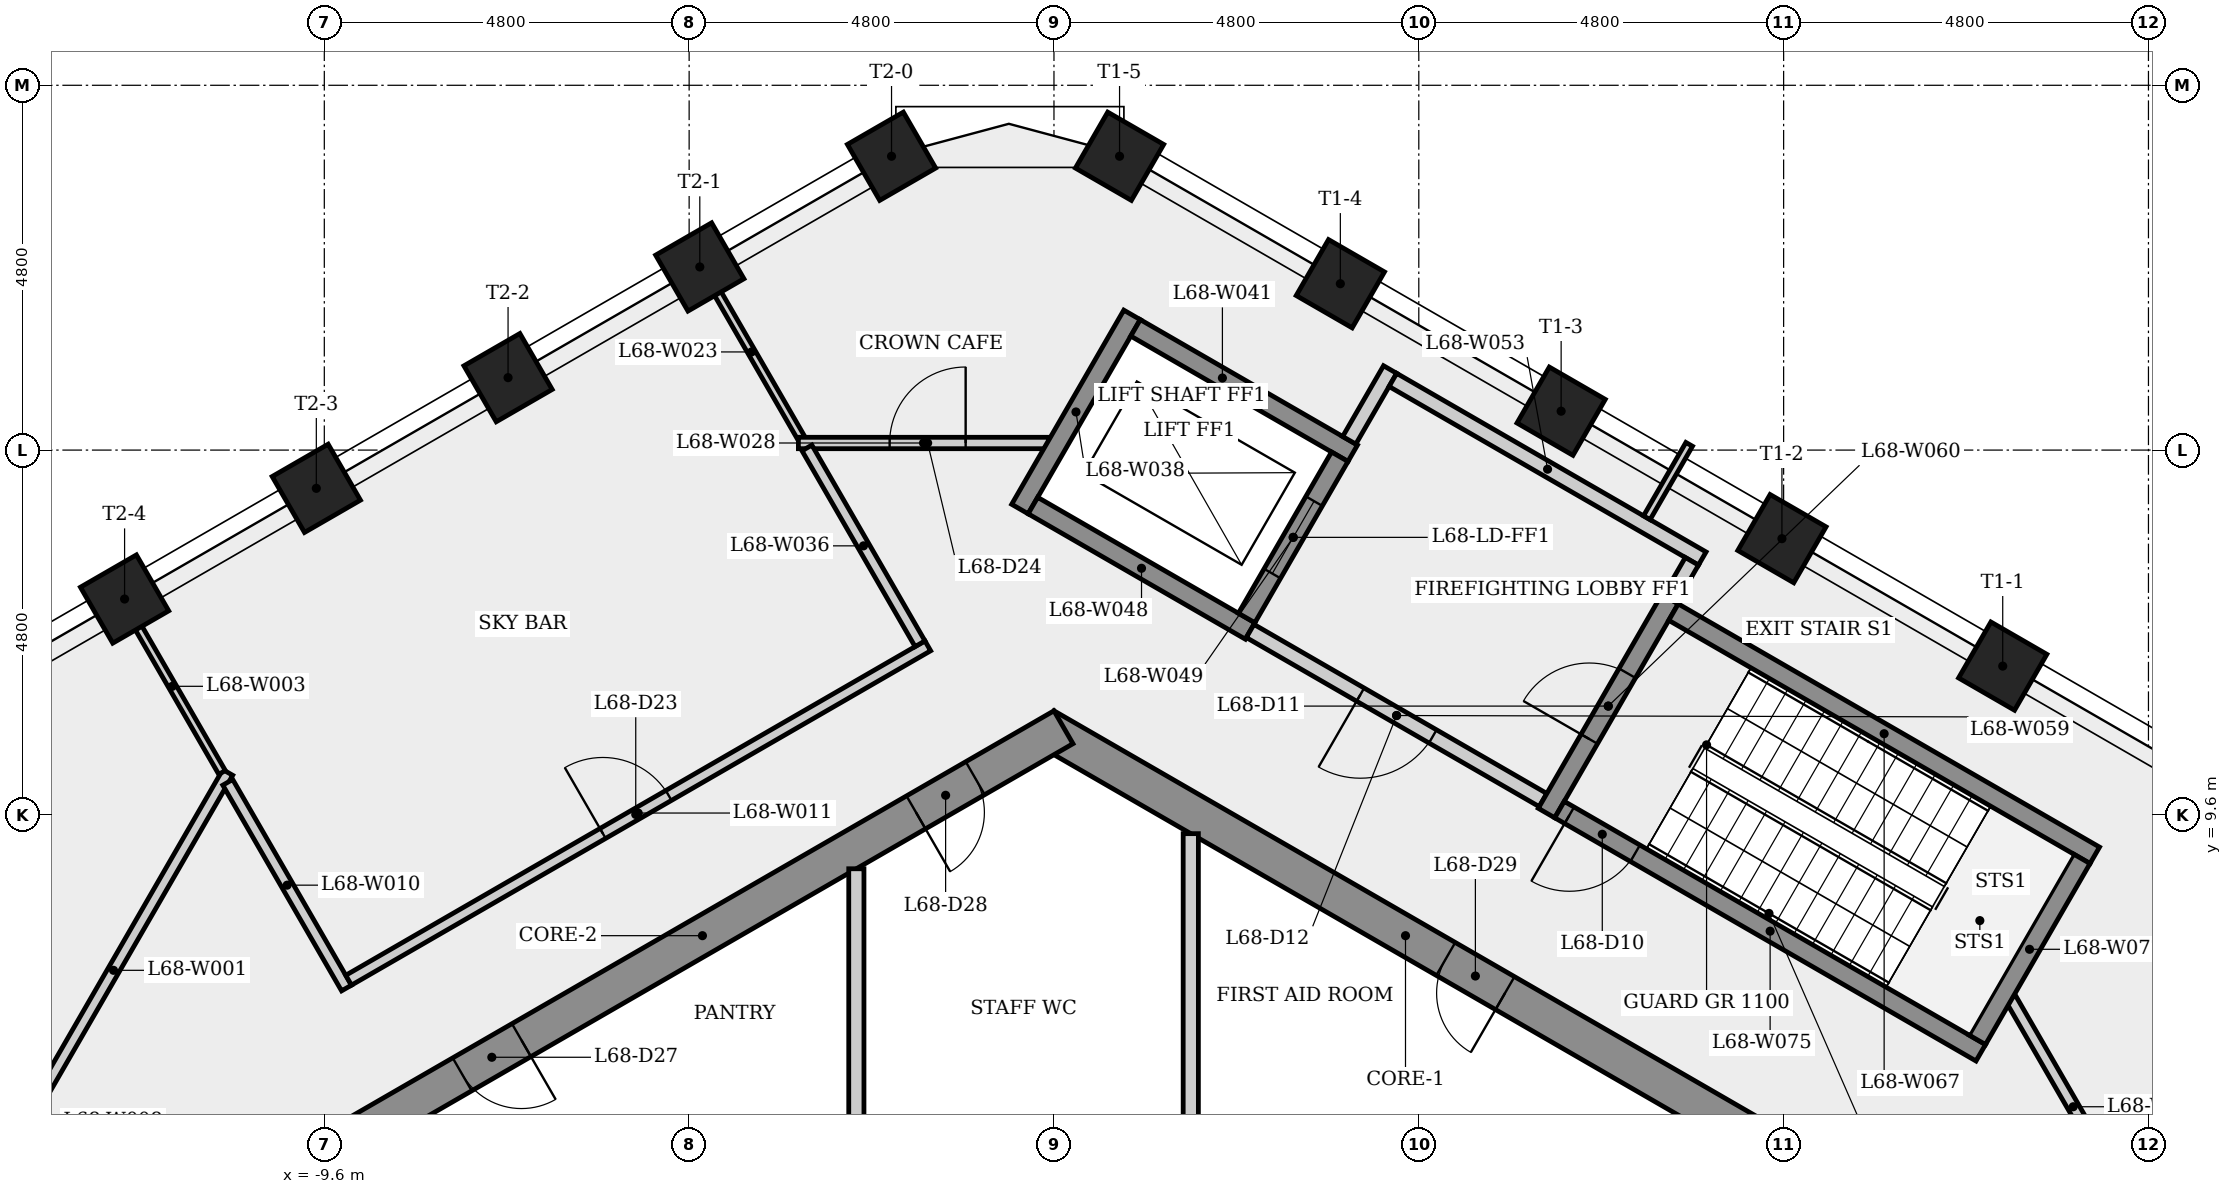
"""IFC4 building model, lengths in metres.
Left out: names, types, materials, properties, quantities, classifications, styles, units other than length and angle.
Written with IfcOpenShell. Run it as: python <this file> out.ifc"""

import sys

from ifc_helpers import new_model, si_unit, direction, frame, frame_2d, origin, origin_2d, place, context, subcontext, project, spatial, rectangle, extrude, element, fill, save


model = new_model("IFC4")
c1 = context("Model", 3, precision=1e-05, world=origin(), true_north=direction((0.0, 1.0)))
c2 = subcontext(c1, "Body", "Model", "MODEL_VIEW")
j1 = project(units=[si_unit("LENGTHUNIT", "METRE"), si_unit("PLANEANGLEUNIT", "RADIAN")], contexts=[c1])
p1 = place(None, origin())
s1 = spatial("IfcSite", under=j1, at=p1, CompositionType="ELEMENT")
p2 = place(p1, origin())
s2 = spatial("IfcBuilding", under=s1, at=p2, CompositionType="ELEMENT")
p3 = place(p2, frame((0.0, 0.0, 252.9)))
s3 = spatial("IfcBuildingStorey", under=s2, at=p3, CompositionType="ELEMENT", Elevation=252.9)
p4 = place(p3, frame((9.375, 5.268, 0.0), z_axis=(0.0, 0.0, 1.0), x_axis=(-0.866023993627, 0.500002442456, 0.0)))
e1 = element("IfcWall", 1, at=p4, inside=s3, PredefinedType="SHEAR", context=c2, shape_type="SweptSolid", body=[
    extrude(rectangle(XDim=10.97, YDim=0.5, at=frame_2d((5.485, 0.0))), origin(), (0.0, 0.0, 1.0), 5.0),
])
p5 = place(p4, frame((3.973, 0.0, 0.0)))
e2 = element("IfcOpeningElement", 2, at=p5, cuts=e1, PredefinedType="OPENING", context=c2, shape_type="SweptSolid", body=[
    extrude(rectangle(XDim=0.9, YDim=2.1, at=frame_2d((0.45, 1.05))), frame((0.0, 0.26, 0.0), z_axis=(0.0, -1.0, 0.0), x_axis=(1.0, 0.0, 0.0)), (0.0, 0.0, 1.0), 0.52),
])
p6 = place(p3, frame((0.125, 10.753, 0.0), z_axis=(0.0, 0.0, 1.0), x_axis=(-0.866023993627, -0.500002442456, 0.0)))
e3 = element("IfcWall", 3, at=p6, inside=s3, PredefinedType="SHEAR", context=c2, shape_type="SweptSolid", body=[
    extrude(rectangle(XDim=10.97, YDim=0.5, at=frame_2d((5.485, 0.0))), origin(), (0.0, 0.0, 1.0), 5.0),
])
p7 = place(p6, frame((8.235, 0.0, 0.0)))
e4 = element("IfcOpeningElement", 4, at=p7, cuts=e3, PredefinedType="OPENING", context=c2, shape_type="SweptSolid", body=[
    extrude(rectangle(XDim=0.9, YDim=2.1, at=frame_2d((0.45, 1.05))), frame((0.0, 0.26, 0.0), z_axis=(0.0, -1.0, 0.0), x_axis=(1.0, 0.0, 0.0)), (0.0, 0.0, 1.0), 0.52),
])
p8 = place(p6, frame((1.34, 0.0, 0.0)))
e5 = element("IfcOpeningElement", 5, at=p8, cuts=e3, PredefinedType="OPENING", context=c2, shape_type="SweptSolid", body=[
    extrude(rectangle(XDim=0.9, YDim=2.1, at=frame_2d((0.45, 1.05))), frame((0.0, 0.26, 0.0), z_axis=(0.0, -1.0, 0.0), x_axis=(1.0, 0.0, 0.0)), (0.0, 0.0, 1.0), 0.52),
])
for number, where, z_axis, x_axis in (
    (6, (12.483, 11.558, 0.0), (0.0, 0.0, 1.0), (0.5, 0.866, 0.0)),
    (7, (9.578, 13.235, 0.0), (0.0, 0.0, 1.0), (0.5, 0.866, 0.0)),
    (8, (6.673, 14.912, 0.0), (0.0, 0.0, 1.0), (0.5, 0.866, 0.0)),
    (9, (3.768, 16.589, 0.0), (0.0, 0.0, 1.0), (0.5, 0.866, 0.0)),
    (10, (0.863, 18.266, 0.0), (0.0, 0.0, 1.0), (0.5, 0.866, 0.0)),
    (11, (-2.137, 18.266, 0.0), (0.0, 0.0, 1.0), (-0.5, 0.866, 0.0)),
    (12, (-4.66, 16.81, 0.0), (0.0, 0.0, 1.0), (-0.5, 0.866, 0.0)),
    (13, (-7.182, 15.353, 0.0), (0.0, 0.0, 1.0), (-0.5, 0.866, 0.0)),
    (14, (-9.705, 13.897, 0.0), (0.0, 0.0, 1.0), (-0.5, 0.866, 0.0)),
    (15, (-12.228, 12.44, 0.0), (0.0, 0.0, 1.0), (-0.5, 0.866, 0.0)),
):
    element("IfcColumn", number, at=place(p3, frame(where, z_axis=z_axis, x_axis=x_axis)), inside=s3, PredefinedType="COLUMN", context=c2, shape_type="SweptSolid", body=[
        extrude(rectangle(XDim=0.85, YDim=0.85, at=origin_2d()), origin(), (0.0, 0.0, 1.0), 5.0),
    ])
p9 = place(p3, frame((-13.877, 4.951, 0.0), z_axis=(0.0, 0.0, 1.0), x_axis=(0.49999074569, 0.866030746697, 0.0)))
e16 = element("IfcWall", 16, at=p9, inside=s3, PredefinedType="PARTITIONING", context=c2, shape_type="SweptSolid", body=[
    extrude(rectangle(XDim=6.013, YDim=0.15, at=frame_2d((3.006, 0.0))), origin(), (0.0, 0.0, 1.0), 4.6),
])
p10 = place(p3, frame((-12.254, 12.425, 0.0), z_axis=(0.0, 0.0, 1.0), x_axis=(0.49999161165, -0.866030246746, 0.0)))
e17 = element("IfcWall", 17, at=p10, inside=s3, PredefinedType="PARTITIONING", context=c2, shape_type="SweptSolid", body=[
    extrude(rectangle(XDim=2.617, YDim=0.1, at=frame_2d((1.309, 0.0))), origin(), (0.0, 0.0, 1.0), 4.6),
])
p11 = place(p3, frame((-10.87, 10.029, 0.0), z_axis=(0.0, 0.0, 1.0), x_axis=(0.499995170647, -0.866028191995, 0.0)))
e18 = element("IfcWall", 18, at=p11, inside=s3, PredefinedType="PARTITIONING", context=c2, shape_type="SweptSolid", body=[
    extrude(rectangle(XDim=3.125, YDim=0.15, at=frame_2d((1.563, 0.0))), origin(), (0.0, 0.0, 1.0), 4.6),
])
p12 = place(p3, frame((-9.28, 7.425, 0.0), z_axis=(0.0, 0.0, 1.0), x_axis=(0.866023408847, 0.500003455318, 0.0)))
e19 = element("IfcWall", 19, at=p12, inside=s3, PredefinedType="PARTITIONING", context=c2, shape_type="SweptSolid", body=[
    extrude(rectangle(XDim=8.799, YDim=0.15, at=frame_2d((4.4, 0.0))), origin(), (0.0, 0.0, 1.0), 4.6),
])
p13 = place(p12, frame((3.862, 0.0, 0.0)))
e20 = element("IfcOpeningElement", 20, at=p13, cuts=e19, PredefinedType="OPENING", context=c2, shape_type="SweptSolid", body=[
    extrude(rectangle(XDim=1.0, YDim=2.1, at=frame_2d((0.5, 1.05))), frame((0.0, 0.085, 0.0), z_axis=(0.0, -1.0, 0.0), x_axis=(1.0, 0.0, 0.0)), (0.0, 0.0, 1.0), 0.17),
])
p14 = place(p3, frame((-4.634, 16.825, 0.0), z_axis=(0.0, 0.0, 1.0), x_axis=(0.49999161165, -0.866030246746, 0.0)))
e21 = element("IfcWall", 21, at=p14, inside=s3, PredefinedType="PARTITIONING", context=c2, shape_type="SweptSolid", body=[
    extrude(rectangle(XDim=2.617, YDim=0.1, at=frame_2d((1.309, 0.0))), origin(), (0.0, 0.0, 1.0), 4.6),
])
p15 = place(p3, frame((-3.363, 14.493, 0.0), z_axis=(0.0, 0.0, 1.0), x_axis=(1.0, 0.0, 0.0)))
e22 = element("IfcWall", 22, at=p15, inside=s3, PredefinedType="PARTITIONING", context=c2, shape_type="SweptSolid", body=[
    extrude(rectangle(XDim=3.291, YDim=0.15, at=frame_2d((1.646, 0.0))), origin(), (0.0, 0.0, 1.0), 4.6),
])
p16 = place(p15, frame((1.2, 0.0, 0.0)))
e23 = element("IfcOpeningElement", 23, at=p16, cuts=e22, PredefinedType="OPENING", context=c2, shape_type="SweptSolid", body=[
    extrude(rectangle(XDim=1.0, YDim=2.1, at=frame_2d((0.5, 1.05))), frame((0.0, 0.085, 0.0), z_axis=(0.0, -1.0, 0.0), x_axis=(1.0, 0.0, 0.0)), (0.0, 0.0, 1.0), 0.17),
])
p17 = place(p3, frame((-2.6, 8.891, 0.0), z_axis=(0.0, 0.0, 1.0), x_axis=(0.0, -1.0, 0.0)))
e24 = element("IfcWall", 24, at=p17, inside=s3, PredefinedType="PARTITIONING", context=c2, shape_type="SweptSolid", body=[
    extrude(rectangle(XDim=3.616, YDim=0.2, at=frame_2d((1.808, 0.0))), origin(), (0.0, 0.0, 1.0), 4.6),
])
p18 = place(p3, frame((-1.762, 11.852, 0.0), z_axis=(0.0, 0.0, 1.0), x_axis=(-0.50007524384, 0.865981957375, 0.0)))
e25 = element("IfcWall", 25, at=p18, inside=s3, PredefinedType="PARTITIONING", context=c2, shape_type="SweptSolid", body=[
    extrude(rectangle(XDim=2.975, YDim=0.15, at=frame_2d((1.488, 0.0))), origin(), (0.0, 0.0, 1.0), 4.6),
])
p19 = place(p3, frame((-0.448, 13.624, 0.0), z_axis=(0.0, 0.0, 1.0), x_axis=(0.500037662692, 0.866003658127, 0.0)))
e26 = element("IfcWall", 26, at=p19, inside=s3, PredefinedType="SHEAR", context=c2, shape_type="SweptSolid", body=[
    extrude(rectangle(XDim=2.95, YDim=0.25, at=frame_2d((1.475, 0.0))), origin(), (0.0, 0.0, 1.0), 4.6),
])
p20 = place(p3, frame((1.073, 16.008, 0.0), z_axis=(0.0, 0.0, 1.0), x_axis=(0.866040211805, -0.499974350878, 0.0)))
e27 = element("IfcWall", 27, at=p20, inside=s3, PredefinedType="SHEAR", context=c2, shape_type="SweptSolid", body=[
    extrude(rectangle(XDim=3.3, YDim=0.25, at=frame_2d((1.65, 0.0))), origin(), (0.0, 0.0, 1.0), 4.6),
])
p21 = place(p3, frame((1.8, 9.353, 0.0), z_axis=(0.0, 0.0, 1.0), x_axis=(0.0, -1.0, 0.0)))
e28 = element("IfcWall", 28, at=p21, inside=s3, PredefinedType="PARTITIONING", context=c2, shape_type="SweptSolid", body=[
    extrude(rectangle(XDim=4.078, YDim=0.2, at=frame_2d((2.039, 0.0))), origin(), (0.0, 0.0, 1.0), 4.6),
])
p22 = place(p3, frame((2.581, 12.02, 0.0), z_axis=(0.0, 0.0, 1.0), x_axis=(-0.866040211805, 0.499974350878, 0.0)))
e29 = element("IfcWall", 29, at=p22, inside=s3, PredefinedType="SHEAR", context=c2, shape_type="SweptSolid", body=[
    extrude(rectangle(XDim=3.3, YDim=0.25, at=frame_2d((1.65, 0.0))), origin(), (0.0, 0.0, 1.0), 4.6),
])
p23 = place(p3, frame((2.535, 12.191, 0.0), z_axis=(0.0, 0.0, 1.0), x_axis=(0.500061746146, 0.865989751695, 0.0)))
e30 = element("IfcWall", 30, at=p23, inside=s3, PredefinedType="SHEAR", context=c2, shape_type="SweptSolid", body=[
    extrude(rectangle(XDim=2.45, YDim=0.25, at=frame_2d((1.225, 0.0))), origin(), (0.0, 0.0, 1.0), 5.0),
])
p24 = place(p23, frame((0.675, 0.0, 0.0)))
e31 = element("IfcOpeningElement", 31, at=p24, cuts=e30, PredefinedType="OPENING", context=c2, shape_type="SweptSolid", body=[
    extrude(rectangle(XDim=1.1, YDim=2.1, at=frame_2d((0.55, 1.05))), frame((0.0, 0.135, 0.0), z_axis=(0.0, -1.0, 0.0), x_axis=(1.0, 0.0, 0.0)), (0.0, 0.0, 1.0), 0.27),
])
p25 = place(p3, frame((3.885, 14.529, 0.0), z_axis=(0.0, 0.0, 1.0), x_axis=(0.499997628298, 0.866026773083, 0.0)))
e32 = element("IfcWall", 32, at=p25, inside=s3, PredefinedType="PARTITIONING", context=c2, shape_type="SweptSolid", body=[
    extrude(rectangle(XDim=1.075, YDim=0.2, at=frame_2d((0.538, 0.0))), origin(), (0.0, 0.0, 1.0), 4.6),
])
p26 = place(p3, frame((4.459, 15.323, 0.0), z_axis=(0.0, 0.0, 1.0), x_axis=(0.866016039709, -0.500016218704, 0.0)))
e33 = element("IfcWall", 33, at=p26, inside=s3, PredefinedType="PARTITIONING", context=c2, shape_type="SweptSolid", body=[
    extrude(rectangle(XDim=4.7, YDim=0.2, at=frame_2d((2.35, 0.0))), origin(), (0.0, 0.0, 1.0), 4.6),
])
p27 = place(p3, frame((6.435, 9.795, 0.0), z_axis=(0.0, 0.0, 1.0), x_axis=(-0.866012907634, 0.500021643343, 0.0)))
e34 = element("IfcWall", 34, at=p27, inside=s3, PredefinedType="PARTITIONING", context=c2, shape_type="SweptSolid", body=[
    extrude(rectangle(XDim=4.45, YDim=0.2, at=frame_2d((2.225, 0.0))), origin(), (0.0, 0.0, 1.0), 4.6),
])
p28 = place(p27, frame((1.675, 0.0, 0.0)))
e35 = element("IfcOpeningElement", 35, at=p28, cuts=e34, PredefinedType="OPENING", context=c2, shape_type="SweptSolid", body=[
    extrude(rectangle(XDim=1.1, YDim=2.1, at=frame_2d((0.55, 1.05))), frame((0.0, 0.11, 0.0), z_axis=(0.0, -1.0, 0.0), x_axis=(1.0, 0.0, 0.0)), (0.0, 0.0, 1.0), 0.22),
])
p29 = place(p3, frame((6.48, 9.624, 0.0), z_axis=(0.0, 0.0, 1.0), x_axis=(0.500017246033, 0.866015446554, 0.0)))
e36 = element("IfcWall", 36, at=p29, inside=s3, PredefinedType="SHEAR", context=c2, shape_type="SweptSolid", body=[
    extrude(rectangle(XDim=3.25, YDim=0.25, at=frame_2d((1.625, 0.0))), origin(), (0.0, 0.0, 1.0), 4.6),
])
p30 = place(p29, frame((1.125, 0.0, 0.0)))
e37 = element("IfcOpeningElement", 37, at=p30, cuts=e36, PredefinedType="OPENING", context=c2, shape_type="SweptSolid", body=[
    extrude(rectangle(XDim=1.0, YDim=2.1, at=frame_2d((0.5, 1.05))), frame((0.0, 0.135, 0.0), z_axis=(0.0, -1.0, 0.0), x_axis=(1.0, 0.0, 0.0)), (0.0, 0.0, 1.0), 0.27),
])
p31 = place(p3, frame((7.8, 13.51, 0.0), z_axis=(0.0, 0.0, 1.0), x_axis=(0.499930968087, 0.86606525571, 0.0)))
e38 = element("IfcWall", 38, at=p31, inside=s3, PredefinedType="PARTITIONING", context=c2, shape_type="SweptSolid", body=[
    extrude(rectangle(XDim=1.115, YDim=0.1, at=frame_2d((0.558, 0.0))), origin(), (0.0, 0.0, 1.0), 4.6),
])
p32 = place(p3, frame((8.151, 12.268, 0.0), z_axis=(0.0, 0.0, 1.0), x_axis=(0.866025499775, -0.499999833739, 0.0)))
e39 = element("IfcWall", 39, at=p32, inside=s3, PredefinedType="SHEAR", context=c2, shape_type="SweptSolid", body=[
    extrude(rectangle(XDim=6.4, YDim=0.25, at=frame_2d((3.2, 0.0))), origin(), (0.0, 0.0, 1.0), 4.6),
])
p33 = place(p3, frame((8.393, 12.937, 0.0), z_axis=(0.0, 0.0, 1.0), x_axis=(-0.500065409566, -0.86598763626, 0.0)))
e40 = element("IfcWall", 40, at=p33, inside=s3, PredefinedType="PARTITIONING", context=c2, shape_type="SweptSolid", body=[
    extrude(rectangle(XDim=0.575, YDim=0.2, at=frame_2d((0.288, 0.0))), origin(), (0.0, 0.0, 1.0), 4.6),
])
p34 = place(p3, frame((12.194, 6.47, 0.0), z_axis=(0.0, 0.0, 1.0), x_axis=(-0.866025499775, 0.499999833739, 0.0)))
e41 = element("IfcWall", 41, at=p34, inside=s3, PredefinedType="SHEAR", context=c2, shape_type="SweptSolid", body=[
    extrude(rectangle(XDim=6.4, YDim=0.25, at=frame_2d((3.2, 0.0))), origin(), (0.0, 0.0, 1.0), 4.6),
])
p35 = place(p34, frame((5.25, 0.0, 0.0)))
e42 = element("IfcOpeningElement", 42, at=p35, cuts=e41, PredefinedType="OPENING", context=c2, shape_type="SweptSolid", body=[
    extrude(rectangle(XDim=1.0, YDim=2.1, at=frame_2d((0.5, 1.05))), frame((0.0, 0.135, 0.0), z_axis=(0.0, -1.0, 0.0), x_axis=(1.0, 0.0, 0.0)), (0.0, 0.0, 1.0), 0.27),
])
p36 = place(p3, frame((12.587, 7.185, 0.0), z_axis=(0.0, 0.0, 1.0), x_axis=(0.50002423369, -0.866011412005, 0.0)))
e43 = element("IfcWall", 43, at=p36, inside=s3, PredefinedType="PARTITIONING", context=c2, shape_type="SweptSolid", body=[
    extrude(rectangle(XDim=3.291, YDim=0.15, at=frame_2d((1.646, 0.0))), origin(), (0.0, 0.0, 1.0), 4.6),
])
p37 = place(p3, frame((12.148, 6.641, 0.0), z_axis=(0.0, 0.0, 1.0), x_axis=(0.500034990121, 0.866005201286, 0.0)))
e44 = element("IfcWall", 44, at=p37, inside=s3, PredefinedType="SHEAR", context=c2, shape_type="SweptSolid", body=[
    extrude(rectangle(XDim=2.75, YDim=0.25, at=frame_2d((1.375, 0.0))), origin(), (0.0, 0.0, 1.0), 4.6),
])
p38 = place(p35, origin())
e45 = element("IfcDoor", 45, at=p38, inside=s3, OperationType="SINGLE_SWING_RIGHT", PredefinedType="DOOR", context=c2, shape_type="SweptSolid", body=[
    extrude(rectangle(XDim=1.0, YDim=2.1, at=frame_2d((0.5, 1.05))), frame((0.0, 0.025, 0.0), z_axis=(0.0, -1.0, 0.0), x_axis=(1.0, 0.0, 0.0)), (0.0, 0.0, 1.0), 0.05),
])
fill(e42, e45)
p39 = place(p30, origin())
e46 = element("IfcDoor", 46, at=p39, inside=s3, OperationType="SINGLE_SWING_LEFT", PredefinedType="DOOR", context=c2, shape_type="SweptSolid", body=[
    extrude(rectangle(XDim=1.0, YDim=2.1, at=frame_2d((0.5, 1.05))), frame((0.0, 0.025, 0.0), z_axis=(0.0, -1.0, 0.0), x_axis=(1.0, 0.0, 0.0)), (0.0, 0.0, 1.0), 0.05),
])
fill(e37, e46)
p40 = place(p28, origin())
e47 = element("IfcDoor", 47, at=p40, inside=s3, OperationType="SINGLE_SWING_RIGHT", PredefinedType="DOOR", context=c2, shape_type="SweptSolid", body=[
    extrude(rectangle(XDim=1.1, YDim=2.1, at=frame_2d((0.55, 1.05))), frame((0.0, 0.025, 0.0), z_axis=(0.0, -1.0, 0.0), x_axis=(1.0, 0.0, 0.0)), (0.0, 0.0, 1.0), 0.05),
])
fill(e35, e47)
p41 = place(p24, origin())
e48 = element("IfcDoor", 48, at=p41, inside=s3, OperationType="SLIDING_TO_LEFT", PredefinedType="DOOR", context=c2, shape_type="SweptSolid", body=[
    extrude(rectangle(XDim=1.1, YDim=2.1, at=frame_2d((0.55, 1.05))), frame((0.0, 0.025, 0.0), z_axis=(0.0, -1.0, 0.0), x_axis=(1.0, 0.0, 0.0)), (0.0, 0.0, 1.0), 0.05),
])
fill(e31, e48)
p42 = place(p13, origin())
e49 = element("IfcDoor", 49, at=p42, inside=s3, OperationType="SINGLE_SWING_LEFT", PredefinedType="DOOR", context=c2, shape_type="SweptSolid", body=[
    extrude(rectangle(XDim=1.0, YDim=2.1, at=frame_2d((0.5, 1.05))), frame((0.0, 0.025, 0.0), z_axis=(0.0, -1.0, 0.0), x_axis=(1.0, 0.0, 0.0)), (0.0, 0.0, 1.0), 0.05),
])
fill(e20, e49)
p43 = place(p16, origin())
e50 = element("IfcDoor", 50, at=p43, inside=s3, OperationType="SINGLE_SWING_RIGHT", PredefinedType="DOOR", context=c2, shape_type="SweptSolid", body=[
    extrude(rectangle(XDim=1.0, YDim=2.1, at=frame_2d((0.5, 1.05))), frame((0.0, 0.025, 0.0), z_axis=(0.0, -1.0, 0.0), x_axis=(1.0, 0.0, 0.0)), (0.0, 0.0, 1.0), 0.05),
])
fill(e23, e50)
p44 = place(p7, origin())
e51 = element("IfcDoor", 51, at=p44, inside=s3, OperationType="SINGLE_SWING_LEFT", PredefinedType="DOOR", context=c2, shape_type="SweptSolid", body=[
    extrude(rectangle(XDim=0.9, YDim=2.1, at=frame_2d((0.45, 1.05))), frame((0.0, 0.025, 0.0), z_axis=(0.0, -1.0, 0.0), x_axis=(1.0, 0.0, 0.0)), (0.0, 0.0, 1.0), 0.05),
])
fill(e4, e51)
p45 = place(p8, origin())
e52 = element("IfcDoor", 52, at=p45, inside=s3, OperationType="SINGLE_SWING_RIGHT", PredefinedType="DOOR", context=c2, shape_type="SweptSolid", body=[
    extrude(rectangle(XDim=0.9, YDim=2.1, at=frame_2d((0.45, 1.05))), frame((0.0, 0.025, 0.0), z_axis=(0.0, -1.0, 0.0), x_axis=(1.0, 0.0, 0.0)), (0.0, 0.0, 1.0), 0.05),
])
fill(e5, e52)
p46 = place(p5, origin())
e53 = element("IfcDoor", 53, at=p46, inside=s3, OperationType="SINGLE_SWING_LEFT", PredefinedType="DOOR", context=c2, shape_type="SweptSolid", body=[
    extrude(rectangle(XDim=0.9, YDim=2.1, at=frame_2d((0.45, 1.05))), frame((0.0, 0.025, 0.0), z_axis=(0.0, -1.0, 0.0), x_axis=(1.0, 0.0, 0.0)), (0.0, 0.0, 1.0), 0.05),
])
fill(e2, e53)
save(model, sys.argv[1])
